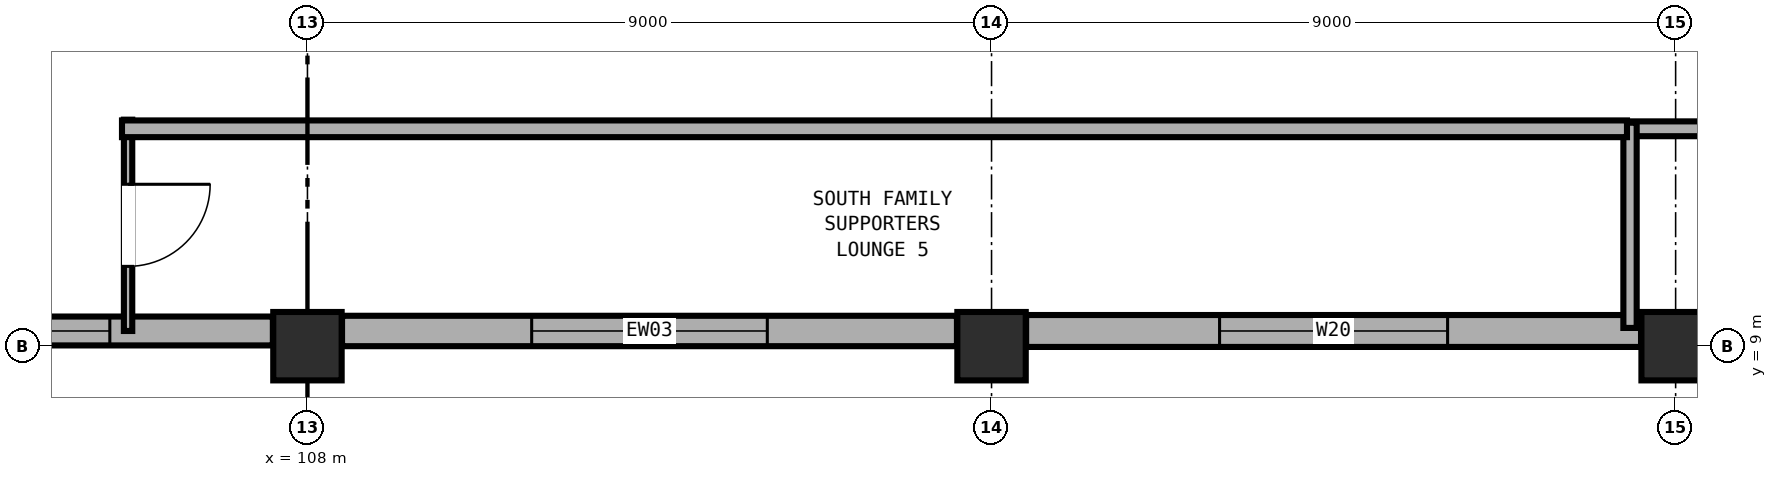
"""IFC4 building model, lengths in metres.
Left out: names, types, materials, properties, quantities, classifications, styles, units other than length and angle.
Written with IfcOpenShell. Run it as: python <this file> out.ifc"""

import sys

from ifc_helpers import new_model, si_unit, direction, frame, frame_2d, origin, origin_2d, place, context, subcontext, project, spatial, rectangle, extrude, element, fill, save


model = new_model("IFC4")
c1 = context("Model", 3, precision=1e-05, world=origin(), true_north=direction((0.0, 1.0)))
c2 = subcontext(c1, "Body", "Model", "MODEL_VIEW")
j1 = project(units=[si_unit("LENGTHUNIT", "METRE"), si_unit("PLANEANGLEUNIT", "RADIAN")], contexts=[c1])
p1 = place(None, origin())
s1 = spatial("IfcSite", under=j1, at=p1, CompositionType="ELEMENT")
p2 = place(p1, origin())
s2 = spatial("IfcBuilding", under=s1, at=p2, CompositionType="ELEMENT")
p3 = place(p2, frame((0.0, 0.0, 4.8)))
s3 = spatial("IfcBuildingStorey", under=s2, at=p3, CompositionType="ELEMENT", Elevation=4.8)
for number, where, z_axis, x_axis in (
    (1, (108.0, 9.0, 0.0), (0.0, 0.0, 1.0), (1.0, 0.0, 0.0)),
    (2, (117.0, 9.0, 0.0), (0.0, 0.0, 1.0), (1.0, 0.0, 0.0)),
    (3, (126.0, 9.0, 0.0), (0.0, 0.0, 1.0), (1.0, 0.0, 0.0)),
):
    element("IfcColumn", number, at=place(p3, frame(where, z_axis=z_axis, x_axis=x_axis)), inside=s3, PredefinedType="COLUMN", context=c2, shape_type="SweptSolid", body=[
        extrude(rectangle(XDim=0.9, YDim=0.9, at=origin_2d()), origin(), (0.0, 0.0, 1.0), 4.8),
    ])
p4 = place(p3, frame((125.545, 9.2, 0.0), z_axis=(0.0, 0.0, 1.0), x_axis=(-1.0, 0.0, 0.0)))
e4 = element("IfcWall", 4, at=p4, inside=s3, PredefinedType="SOLIDWALL", context=c2, shape_type="SweptSolid", body=[
    extrude(rectangle(XDim=8.09, YDim=0.42, at=frame_2d((4.045, 0.0))), origin(), (0.0, 0.0, 1.0), 3.58),
])
p5 = place(p4, frame((2.545, 0.0, 0.9)))
e5 = element("IfcOpeningElement", 5, at=p5, cuts=e4, PredefinedType="OPENING", context=c2, shape_type="SweptSolid", body=[
    extrude(rectangle(XDim=3.0, YDim=2.2, at=frame_2d((1.5, 1.1))), frame((0.0, 0.22, 0.0), z_axis=(0.0, -1.0, 0.0), x_axis=(1.0, 0.0, 0.0)), (0.0, 0.0, 1.0), 0.44),
])
p6 = place(p3, frame((116.545, 9.2, 0.0), z_axis=(0.0, 0.0, 1.0), x_axis=(-1.0, 0.0, 0.0)))
e6 = element("IfcWall", 6, at=p6, inside=s3, PredefinedType="SOLIDWALL", context=c2, shape_type="SweptSolid", body=[
    extrude(rectangle(XDim=8.09, YDim=0.4, at=frame_2d((4.045, 0.0))), origin(), (0.0, 0.0, 1.0), 3.58),
])
p7 = place(p6, frame((2.495, 0.0, 0.9)))
e7 = element("IfcOpeningElement", 7, at=p7, cuts=e6, PredefinedType="OPENING", context=c2, shape_type="SweptSolid", body=[
    extrude(rectangle(XDim=3.1, YDim=2.1, at=frame_2d((1.55, 1.05))), frame((0.0, 0.21, 0.0), z_axis=(0.0, -1.0, 0.0), x_axis=(1.0, 0.0, 0.0)), (0.0, 0.0, 1.0), 0.42),
])
p8 = place(p3, frame((107.545, 9.2, 0.0), z_axis=(0.0, 0.0, 1.0), x_axis=(-1.0, 0.0, 0.0)))
e8 = element("IfcWall", 8, at=p8, inside=s3, PredefinedType="SOLIDWALL", context=c2, shape_type="SweptSolid", body=[
    extrude(rectangle(XDim=8.09, YDim=0.38, at=frame_2d((4.045, 0.0))), origin(), (0.0, 0.0, 1.0), 3.58),
])
p9 = place(p8, frame((2.145, 0.0, 0.9)))
e9 = element("IfcOpeningElement", 9, at=p9, cuts=e8, PredefinedType="OPENING", context=c2, shape_type="SweptSolid", body=[
    extrude(rectangle(XDim=3.2, YDim=2.05, at=frame_2d((1.6, 1.025))), frame((0.0, 0.2, 0.0), z_axis=(0.0, -1.0, 0.0), x_axis=(1.0, 0.0, 0.0)), (0.0, 0.0, 1.0), 0.4),
])
p10 = place(p3, frame((145.28, 11.86, 0.0), z_axis=(0.0, 0.0, 1.0), x_axis=(-1.0, 0.0, 0.0)))
e10 = element("IfcWall", 10, at=p10, inside=s3, PredefinedType="PARTITIONING", context=c2, shape_type="SweptSolid", body=[
    extrude(rectangle(XDim=19.88, YDim=0.195, at=frame_2d((9.94, 0.0))), origin(), (0.0, 0.0, 1.0), 3.28),
])
p11 = place(p10, frame((9.415, 0.0, 0.0)))
e11 = element("IfcOpeningElement", 11, at=p11, cuts=e10, PredefinedType="OPENING", context=c2, shape_type="SweptSolid", body=[
    extrude(rectangle(XDim=1.05, YDim=2.1, at=frame_2d((0.525, 1.05))), frame((0.0, 0.107, 0.0), z_axis=(0.0, -1.0, 0.0), x_axis=(1.0, 0.0, 0.0)), (0.0, 0.0, 1.0), 0.215),
])
p12 = place(p3, frame((125.4, 9.24, 0.0), z_axis=(0.0, 0.0, 1.0), x_axis=(0.0, 1.0, 0.0)))
e12 = element("IfcWall", 12, at=p12, inside=s3, PredefinedType="PARTITIONING", context=c2, shape_type="SweptSolid", body=[
    extrude(rectangle(XDim=2.7, YDim=0.175, at=frame_2d((1.35, 0.0))), origin(), (0.0, 0.0, 1.0), 3.28),
])
p13 = place(p3, frame((105.64, 11.98, 0.0), z_axis=(0.0, 0.0, 1.0), x_axis=(0.0, -1.0, 0.0)))
e13 = element("IfcWall", 13, at=p13, inside=s3, PredefinedType="PARTITIONING", context=c2, shape_type="SweptSolid", body=[
    extrude(rectangle(XDim=2.78, YDim=0.11, at=frame_2d((1.39, 0.0))), origin(), (0.0, 0.0, 1.0), 3.28),
])
p14 = place(p13, frame((0.85, 0.0, 0.0)))
e14 = element("IfcOpeningElement", 14, at=p14, cuts=e13, PredefinedType="OPENING", context=c2, shape_type="SweptSolid", body=[
    extrude(rectangle(XDim=1.08, YDim=2.18, at=frame_2d((0.54, 1.09))), frame((0.0, 0.065, 0.0), z_axis=(0.0, -1.0, 0.0), x_axis=(1.0, 0.0, 0.0)), (0.0, 0.0, 1.0), 0.13),
])
p15 = place(p3, frame((105.56, 11.86, 0.0), z_axis=(0.0, 0.0, 1.0), x_axis=(1.0, 0.0, 0.0)))
e15 = element("IfcWall", 15, at=p15, inside=s3, PredefinedType="PARTITIONING", context=c2, shape_type="SweptSolid", body=[
    extrude(rectangle(XDim=19.8, YDim=0.22, at=frame_2d((9.9, 0.0))), origin(), (0.0, 0.0, 1.0), 3.28),
])
p16 = place(p5, origin())
e16 = element("IfcWindow", 16, at=p16, inside=s3, PartitioningType="DOUBLE_PANEL_VERTICAL", PredefinedType="WINDOW", context=c2, shape_type="SweptSolid", body=[
    extrude(rectangle(XDim=3.0, YDim=2.2, at=frame_2d((1.5, 1.1))), frame((0.0, 0.03, 0.0), z_axis=(0.0, -1.0, 0.0), x_axis=(1.0, 0.0, 0.0)), (0.0, 0.0, 1.0), 0.06),
])
fill(e5, e16)
p17 = place(p7, origin())
e17 = element("IfcWindow", 17, at=p17, inside=s3, PartitioningType="DOUBLE_PANEL_VERTICAL", PredefinedType="WINDOW", context=c2, shape_type="SweptSolid", body=[
    extrude(rectangle(XDim=3.1, YDim=2.1, at=frame_2d((1.55, 1.05))), frame((0.0, 0.03, 0.0), z_axis=(0.0, -1.0, 0.0), x_axis=(1.0, 0.0, 0.0)), (0.0, 0.0, 1.0), 0.06),
])
fill(e7, e17)
p18 = place(p9, origin())
e18 = element("IfcWindow", 18, at=p18, inside=s3, PartitioningType="DOUBLE_PANEL_VERTICAL", PredefinedType="WINDOW", context=c2, shape_type="SweptSolid", body=[
    extrude(rectangle(XDim=3.2, YDim=2.05, at=frame_2d((1.6, 1.025))), frame((0.0, 0.03, 0.0), z_axis=(0.0, -1.0, 0.0), x_axis=(1.0, 0.0, 0.0)), (0.0, 0.0, 1.0), 0.06),
])
fill(e9, e18)
p19 = place(p14, origin())
e19 = element("IfcDoor", 19, at=p19, inside=s3, OperationType="SINGLE_SWING_LEFT", PredefinedType="DOOR", context=c2, shape_type="SweptSolid", body=[
    extrude(rectangle(XDim=1.08, YDim=2.18, at=frame_2d((0.54, 1.09))), frame((0.0, 0.025, 0.0), z_axis=(0.0, -1.0, 0.0), x_axis=(1.0, 0.0, 0.0)), (0.0, 0.0, 1.0), 0.05),
])
fill(e14, e19)
save(model, sys.argv[1])
